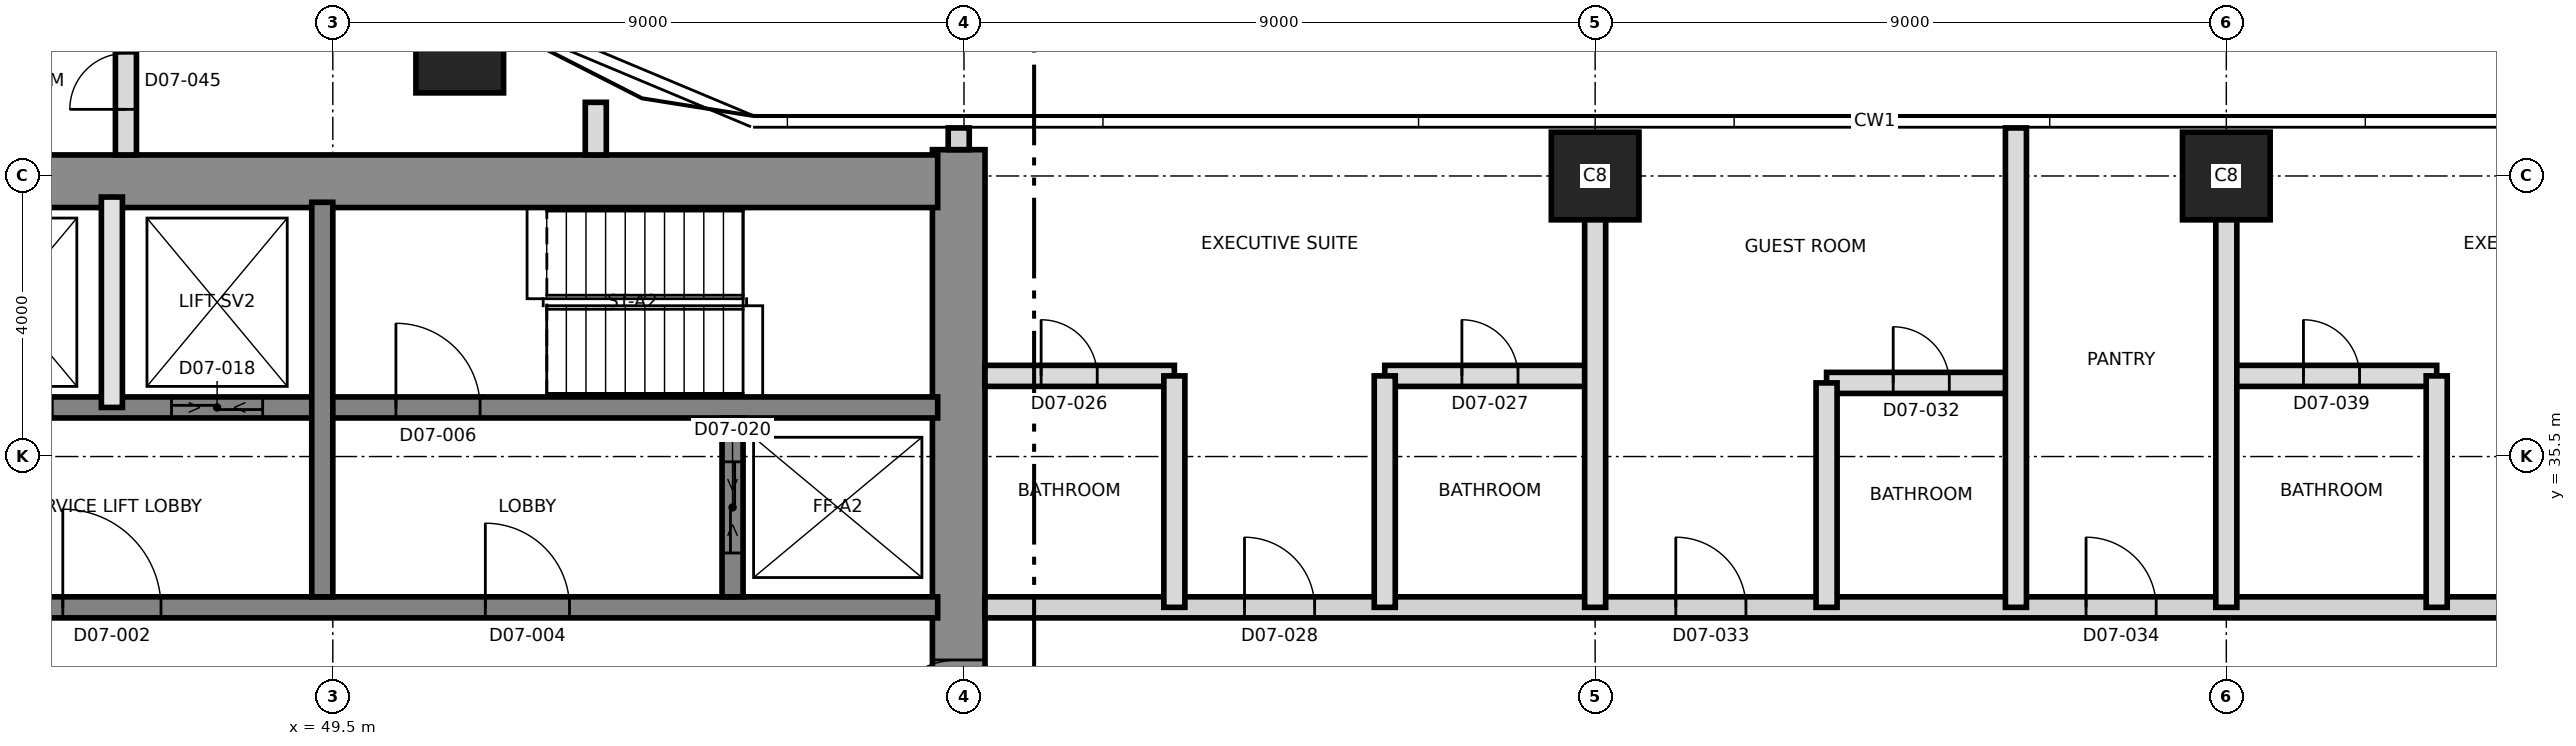
"""IFC4 building model, lengths in metres.
Left out: names, types, materials, properties, quantities, classifications, styles, units other than length and angle.
Written with IfcOpenShell. Run it as: python <this file> out.ifc"""

import sys

from ifc_helpers import new_model, si_unit, direction, frame, frame_2d, origin, origin_2d, place, context, subcontext, project, spatial, rectangle, extrude, element, fill, save


model = new_model("IFC4")
c1 = context("Model", 3, precision=1e-05, world=origin(), true_north=direction((0.0, 1.0)))
c2 = subcontext(c1, "Body", "Model", "MODEL_VIEW")
j1 = project(units=[si_unit("LENGTHUNIT", "METRE"), si_unit("PLANEANGLEUNIT", "RADIAN")], contexts=[c1])
p1 = place(None, origin())
s1 = spatial("IfcSite", under=j1, at=p1, CompositionType="ELEMENT")
p2 = place(p1, origin())
s2 = spatial("IfcBuilding", under=s1, at=p2, CompositionType="ELEMENT")
p3 = place(p2, frame((0.0, 0.0, 87.1)))
s3 = spatial("IfcBuildingStorey", under=s2, at=p3, CompositionType="ELEMENT", Elevation=87.1)
p4 = place(p3, frame((58.425, 21.125, 0.0), z_axis=(0.0, 0.0, 1.0), x_axis=(0.0, 1.0, 0.0)))
e1 = element("IfcWall", 1, at=p4, inside=s3, PredefinedType="SHEAR", context=c2, shape_type="SweptSolid", body=[
    extrude(rectangle(XDim=18.75, YDim=0.75, at=frame_2d((9.375, 0.0))), origin(), (0.0, 0.0, 1.0), 3.7),
])
p5 = place(p4, frame((10.275, 0.0, 0.0)))
e2 = element("IfcOpeningElement", 2, at=p5, cuts=e1, PredefinedType="OPENING", context=c2, shape_type="SweptSolid", body=[
    extrude(rectangle(XDim=1.2, YDim=2.1, at=frame_2d((0.6, 1.05))), frame((0.0, 0.385, 0.0), z_axis=(0.0, -1.0, 0.0), x_axis=(1.0, 0.0, 0.0)), (0.0, 0.0, 1.0), 0.77),
])
p6 = place(p3, frame((31.125, 39.425, 0.0), z_axis=(0.0, 0.0, 1.0), x_axis=(1.0, 0.0, 0.0)))
e3 = element("IfcWall", 3, at=p6, inside=s3, PredefinedType="SHEAR", context=c2, shape_type="SweptSolid", body=[
    extrude(rectangle(XDim=27.0, YDim=0.75, at=frame_2d((13.5, 0.0))), origin(), (0.0, 0.0, 1.0), 3.7),
])
p7 = place(p6, frame((10.575, 0.0, 0.0)))
e4 = element("IfcOpeningElement", 4, at=p7, cuts=e3, PredefinedType="OPENING", context=c2, shape_type="SweptSolid", body=[
    extrude(rectangle(XDim=1.2, YDim=2.1, at=frame_2d((0.6, 1.05))), frame((0.0, 0.385, 0.0), z_axis=(0.0, -1.0, 0.0), x_axis=(1.0, 0.0, 0.0)), (0.0, 0.0, 1.0), 0.77),
])
p8 = place(p3, frame((31.875, 33.35, 0.0), z_axis=(0.0, 0.0, 1.0), x_axis=(1.0, 0.0, 0.0)))
e5 = element("IfcWall", 5, at=p8, inside=s3, PredefinedType="SHEAR", context=c2, shape_type="SweptSolid", body=[
    extrude(rectangle(XDim=26.25, YDim=0.3, at=frame_2d((13.125, 0.0))), origin(), (0.0, 0.0, 1.0), 3.7),
])
p9 = place(p8, frame((13.775, 0.0, 0.0)))
e6 = element("IfcOpeningElement", 6, at=p9, cuts=e5, PredefinedType="OPENING", context=c2, shape_type="SweptSolid", body=[
    extrude(rectangle(XDim=1.4, YDim=2.1, at=frame_2d((0.7, 1.05))), frame((0.0, 0.16, 0.0), z_axis=(0.0, -1.0, 0.0), x_axis=(1.0, 0.0, 0.0)), (0.0, 0.0, 1.0), 0.32),
])
p10 = place(p8, frame((5.25, 0.0, 0.0)))
e7 = element("IfcOpeningElement", 7, at=p10, cuts=e5, PredefinedType="OPENING", context=c2, shape_type="SweptSolid", body=[
    extrude(rectangle(XDim=1.2, YDim=2.1, at=frame_2d((0.6, 1.05))), frame((0.0, 0.16, 0.0), z_axis=(0.0, -1.0, 0.0), x_axis=(1.0, 0.0, 0.0)), (0.0, 0.0, 1.0), 0.32),
])
p11 = place(p8, frame((19.8, 0.0, 0.0)))
e8 = element("IfcOpeningElement", 8, at=p11, cuts=e5, PredefinedType="OPENING", context=c2, shape_type="SweptSolid", body=[
    extrude(rectangle(XDim=1.2, YDim=2.1, at=frame_2d((0.6, 1.05))), frame((0.0, 0.16, 0.0), z_axis=(0.0, -1.0, 0.0), x_axis=(1.0, 0.0, 0.0)), (0.0, 0.0, 1.0), 0.32),
])
p12 = place(p3, frame((43.5, 36.2, 0.0), z_axis=(0.0, 0.0, 1.0), x_axis=(1.0, 0.0, 0.0)))
e9 = element("IfcWall", 9, at=p12, inside=s3, PredefinedType="SHEAR", context=c2, shape_type="SweptSolid", body=[
    extrude(rectangle(XDim=14.625, YDim=0.3, at=frame_2d((7.312, 0.0))), origin(), (0.0, 0.0, 1.0), 3.7),
])
p13 = place(p12, frame((6.9, 0.0, 0.0)))
e10 = element("IfcOpeningElement", 10, at=p13, cuts=e9, PredefinedType="OPENING", context=c2, shape_type="SweptSolid", body=[
    extrude(rectangle(XDim=1.2, YDim=2.1, at=frame_2d((0.6, 1.05))), frame((0.0, 0.16, 0.0), z_axis=(0.0, -1.0, 0.0), x_axis=(1.0, 0.0, 0.0)), (0.0, 0.0, 1.0), 0.32),
])
p14 = place(p12, frame((0.7, 0.0, 0.0)))
e11 = element("IfcOpeningElement", 11, at=p14, cuts=e9, PredefinedType="OPENING", context=c2, shape_type="SweptSolid", body=[
    extrude(rectangle(XDim=1.3, YDim=2.4, at=frame_2d((0.65, 1.2))), frame((0.0, 0.16, 0.0), z_axis=(0.0, -1.0, 0.0), x_axis=(1.0, 0.0, 0.0)), (0.0, 0.0, 1.0), 0.32),
])
p15 = place(p12, frame((3.7, 0.0, 0.0)))
e12 = element("IfcOpeningElement", 12, at=p15, cuts=e9, PredefinedType="OPENING", context=c2, shape_type="SweptSolid", body=[
    extrude(rectangle(XDim=1.3, YDim=2.4, at=frame_2d((0.65, 1.2))), frame((0.0, 0.16, 0.0), z_axis=(0.0, -1.0, 0.0), x_axis=(1.0, 0.0, 0.0)), (0.0, 0.0, 1.0), 0.32),
])
p16 = place(p3, frame((49.35, 33.5, 0.0), z_axis=(0.0, 0.0, 1.0), x_axis=(0.0, 1.0, 0.0)))
e13 = element("IfcWall", 13, at=p16, inside=s3, PredefinedType="SHEAR", context=c2, shape_type="SweptSolid", body=[
    extrude(rectangle(XDim=5.625, YDim=0.3, at=frame_2d((2.812, 0.0))), origin(), (0.0, 0.0, 1.0), 3.7),
])
p17 = place(p3, frame((55.2, 33.5, 0.0), z_axis=(0.0, 0.0, 1.0), x_axis=(0.0, 1.0, 0.0)))
e14 = element("IfcWall", 14, at=p17, inside=s3, PredefinedType="SHEAR", context=c2, shape_type="SweptSolid", body=[
    extrude(rectangle(XDim=2.55, YDim=0.3, at=frame_2d((1.275, 0.0))), origin(), (0.0, 0.0, 1.0), 3.7),
])
p18 = place(p17, frame((0.625, 0.0, 0.0)))
e15 = element("IfcOpeningElement", 15, at=p18, cuts=e14, PredefinedType="OPENING", context=c2, shape_type="SweptSolid", body=[
    extrude(rectangle(XDim=1.3, YDim=2.4, at=frame_2d((0.65, 1.2))), frame((0.0, 0.16, 0.0), z_axis=(0.0, -1.0, 0.0), x_axis=(1.0, 0.0, 0.0)), (0.0, 0.0, 1.0), 0.32),
])
for number, where, z_axis, x_axis in (
    (16, (67.5, 39.5, 0.0), (0.0, 0.0, 1.0), (1.0, 0.0, 0.0)),
    (17, (76.5, 39.5, 0.0), (0.0, 0.0, 1.0), (1.0, 0.0, 0.0)),
    (18, (51.31, 41.31, 0.0), (0.0, 0.0, 1.0), (1.0, 0.0, 0.0)),
):
    element("IfcColumn", number, at=place(p3, frame(where, z_axis=z_axis, x_axis=x_axis)), inside=s3, PredefinedType="COLUMN", context=c2, shape_type="SweptSolid", body=[
        extrude(rectangle(XDim=1.25, YDim=1.25, at=origin_2d()), origin(), (0.0, 0.0, 1.0), 3.7),
    ])
p19 = place(p3, frame((46.35, 36.2, 0.0), z_axis=(0.0, 0.0, 1.0), x_axis=(0.0, 1.0, 0.0)))
e19 = element("IfcWall", 19, at=p19, inside=s3, PredefinedType="SOLIDWALL", context=c2, shape_type="SweptSolid", body=[
    extrude(rectangle(XDim=3.0, YDim=0.3, at=frame_2d((1.5, 0.0))), origin(), (0.0, 0.0, 1.0), 3.4),
])
p20 = place(p3, frame((58.8, 33.35, 0.0), z_axis=(0.0, 0.0, 1.0), x_axis=(1.0, 0.0, 0.0)))
e20 = element("IfcWall", 20, at=p20, inside=s3, PredefinedType="PARTITIONING", context=c2, shape_type="SweptSolid", body=[
    extrude(rectangle(XDim=26.53, YDim=0.3, at=frame_2d((13.265, 0.0))), origin(), (0.0, 0.0, 1.0), 3.4),
])
p21 = place(p20, frame((3.7, 0.0, 0.0)))
e21 = element("IfcOpeningElement", 21, at=p21, cuts=e20, PredefinedType="OPENING", context=c2, shape_type="SweptSolid", body=[
    extrude(rectangle(XDim=1.0, YDim=2.4, at=frame_2d((0.5, 1.2))), frame((0.0, 0.16, 0.0), z_axis=(0.0, -1.0, 0.0), x_axis=(1.0, 0.0, 0.0)), (0.0, 0.0, 1.0), 0.32),
])
p22 = place(p20, frame((9.85, 0.0, 0.0)))
e22 = element("IfcOpeningElement", 22, at=p22, cuts=e20, PredefinedType="OPENING", context=c2, shape_type="SweptSolid", body=[
    extrude(rectangle(XDim=1.0, YDim=2.1, at=frame_2d((0.5, 1.05))), frame((0.0, 0.16, 0.0), z_axis=(0.0, -1.0, 0.0), x_axis=(1.0, 0.0, 0.0)), (0.0, 0.0, 1.0), 0.32),
])
p23 = place(p20, frame((15.7, 0.0, 0.0)))
e23 = element("IfcOpeningElement", 23, at=p23, cuts=e20, PredefinedType="OPENING", context=c2, shape_type="SweptSolid", body=[
    extrude(rectangle(XDim=1.0, YDim=2.1, at=frame_2d((0.5, 1.05))), frame((0.0, 0.16, 0.0), z_axis=(0.0, -1.0, 0.0), x_axis=(1.0, 0.0, 0.0)), (0.0, 0.0, 1.0), 0.32),
])
p24 = place(p20, frame((21.7, 0.0, 0.0)))
e24 = element("IfcOpeningElement", 24, at=p24, cuts=e20, PredefinedType="OPENING", context=c2, shape_type="SweptSolid", body=[
    extrude(rectangle(XDim=1.0, YDim=2.4, at=frame_2d((0.5, 1.2))), frame((0.0, 0.16, 0.0), z_axis=(0.0, -1.0, 0.0), x_axis=(1.0, 0.0, 0.0)), (0.0, 0.0, 1.0), 0.32),
])
p25 = place(p3, frame((70.8, 36.55, 0.0), z_axis=(0.0, 0.0, 1.0), x_axis=(1.0, 0.0, 0.0)))
e25 = element("IfcWall", 25, at=p25, inside=s3, PredefinedType="PARTITIONING", context=c2, shape_type="SweptSolid", body=[
    extrude(rectangle(XDim=2.7, YDim=0.3, at=frame_2d((1.35, 0.0))), origin(), (0.0, 0.0, 1.0), 3.4),
])
p26 = place(p25, frame((0.95, 0.0, 0.0)))
e26 = element("IfcOpeningElement", 26, at=p26, cuts=e25, PredefinedType="OPENING", context=c2, shape_type="SweptSolid", body=[
    extrude(rectangle(XDim=0.8, YDim=2.1, at=frame_2d((0.4, 1.05))), frame((0.0, 0.16, 0.0), z_axis=(0.0, -1.0, 0.0), x_axis=(1.0, 0.0, 0.0)), (0.0, 0.0, 1.0), 0.32),
])
p27 = place(p3, frame((58.8, 36.65, 0.0), z_axis=(0.0, 0.0, 1.0), x_axis=(1.0, 0.0, 0.0)))
e27 = element("IfcWall", 27, at=p27, inside=s3, PredefinedType="PARTITIONING", context=c2, shape_type="SweptSolid", body=[
    extrude(rectangle(XDim=2.7, YDim=0.3, at=frame_2d((1.35, 0.0))), origin(), (0.0, 0.0, 1.0), 3.4),
])
p28 = place(p27, frame((0.8, 0.0, 0.0)))
e28 = element("IfcOpeningElement", 28, at=p28, cuts=e27, PredefinedType="OPENING", context=c2, shape_type="SweptSolid", body=[
    extrude(rectangle(XDim=0.8, YDim=2.1, at=frame_2d((0.4, 1.05))), frame((0.0, 0.16, 0.0), z_axis=(0.0, -1.0, 0.0), x_axis=(1.0, 0.0, 0.0)), (0.0, 0.0, 1.0), 0.32),
])
p29 = place(p3, frame((64.5, 36.65, 0.0), z_axis=(0.0, 0.0, 1.0), x_axis=(1.0, 0.0, 0.0)))
e29 = element("IfcWall", 29, at=p29, inside=s3, PredefinedType="PARTITIONING", context=c2, shape_type="SweptSolid", body=[
    extrude(rectangle(XDim=3.0, YDim=0.3, at=frame_2d((1.5, 0.0))), origin(), (0.0, 0.0, 1.0), 3.4),
])
p30 = place(p29, frame((1.1, 0.0, 0.0)))
e30 = element("IfcOpeningElement", 30, at=p30, cuts=e29, PredefinedType="OPENING", context=c2, shape_type="SweptSolid", body=[
    extrude(rectangle(XDim=0.8, YDim=2.1, at=frame_2d((0.4, 1.05))), frame((0.0, 0.16, 0.0), z_axis=(0.0, -1.0, 0.0), x_axis=(1.0, 0.0, 0.0)), (0.0, 0.0, 1.0), 0.32),
])
p31 = place(p3, frame((76.5, 36.65, 0.0), z_axis=(0.0, 0.0, 1.0), x_axis=(1.0, 0.0, 0.0)))
e31 = element("IfcWall", 31, at=p31, inside=s3, PredefinedType="PARTITIONING", context=c2, shape_type="SweptSolid", body=[
    extrude(rectangle(XDim=3.0, YDim=0.3, at=frame_2d((1.5, 0.0))), origin(), (0.0, 0.0, 1.0), 3.4),
])
p32 = place(p31, frame((1.1, 0.0, 0.0)))
e32 = element("IfcOpeningElement", 32, at=p32, cuts=e31, PredefinedType="OPENING", context=c2, shape_type="SweptSolid", body=[
    extrude(rectangle(XDim=0.8, YDim=2.1, at=frame_2d((0.4, 1.05))), frame((0.0, 0.16, 0.0), z_axis=(0.0, -1.0, 0.0), x_axis=(1.0, 0.0, 0.0)), (0.0, 0.0, 1.0), 0.32),
])
p33 = place(p3, frame((46.55, 39.8, 0.0), z_axis=(0.0, 0.0, 1.0), x_axis=(0.0, 1.0, 0.0)))
e33 = element("IfcWall", 33, at=p33, inside=s3, PredefinedType="PARTITIONING", context=c2, shape_type="SweptSolid", body=[
    extrude(rectangle(XDim=2.4, YDim=0.3, at=frame_2d((1.2, 0.0))), origin(), (0.0, 0.0, 1.0), 3.4),
])
p34 = place(p33, frame((0.65, 0.0, 0.0)))
e34 = element("IfcOpeningElement", 34, at=p34, cuts=e33, PredefinedType="OPENING", context=c2, shape_type="SweptSolid", body=[
    extrude(rectangle(XDim=0.8, YDim=2.1, at=frame_2d((0.4, 1.05))), frame((0.0, 0.16, 0.0), z_axis=(0.0, -1.0, 0.0), x_axis=(1.0, 0.0, 0.0)), (0.0, 0.0, 1.0), 0.32),
])
p35 = place(p3, frame((53.25, 39.8, 0.0), z_axis=(0.0, 0.0, 1.0), x_axis=(0.0, 1.0, 0.0)))
e35 = element("IfcWall", 35, at=p35, inside=s3, PredefinedType="PARTITIONING", context=c2, shape_type="SweptSolid", body=[
    extrude(rectangle(XDim=0.75, YDim=0.3, at=frame_2d((0.375, 0.0))), origin(), (0.0, 0.0, 1.0), 3.4),
])
for number, where, z_axis, x_axis in (
    (36, (61.5, 33.35, 0.0), (0.0, 0.0, 1.0), (0.0, 1.0, 0.0)),
    (37, (64.5, 33.35, 0.0), (0.0, 0.0, 1.0), (0.0, 1.0, 0.0)),
):
    element("IfcWall", number, at=place(p3, frame(where, z_axis=z_axis, x_axis=x_axis)), inside=s3, PredefinedType="PARTITIONING", context=c2, shape_type="SweptSolid", body=[
        extrude(rectangle(XDim=3.3, YDim=0.3, at=frame_2d((1.65, 0.0))), origin(), (0.0, 0.0, 1.0), 3.4),
    ])
p36 = place(p3, frame((67.5, 33.35, 0.0), z_axis=(0.0, 0.0, 1.0), x_axis=(0.0, 1.0, 0.0)))
e38 = element("IfcWall", 38, at=p36, inside=s3, PredefinedType="PARTITIONING", context=c2, shape_type="SweptSolid", body=[
    extrude(rectangle(XDim=6.655, YDim=0.3, at=frame_2d((3.327, 0.0))), origin(), (0.0, 0.0, 1.0), 3.4),
])
p37 = place(p3, frame((70.8, 33.35, 0.0), z_axis=(0.0, 0.0, 1.0), x_axis=(0.0, 1.0, 0.0)))
e39 = element("IfcWall", 39, at=p37, inside=s3, PredefinedType="PARTITIONING", context=c2, shape_type="SweptSolid", body=[
    extrude(rectangle(XDim=3.2, YDim=0.3, at=frame_2d((1.6, 0.0))), origin(), (0.0, 0.0, 1.0), 3.4),
])
p38 = place(p3, frame((73.5, 33.35, 0.0), z_axis=(0.0, 0.0, 1.0), x_axis=(0.0, 1.0, 0.0)))
e40 = element("IfcWall", 40, at=p38, inside=s3, PredefinedType="PARTITIONING", context=c2, shape_type="SweptSolid", body=[
    extrude(rectangle(XDim=6.835, YDim=0.3, at=frame_2d((3.417, 0.0))), origin(), (0.0, 0.0, 1.0), 3.4),
])
p39 = place(p3, frame((76.5, 33.35, 0.0), z_axis=(0.0, 0.0, 1.0), x_axis=(0.0, 1.0, 0.0)))
e41 = element("IfcWall", 41, at=p39, inside=s3, PredefinedType="PARTITIONING", context=c2, shape_type="SweptSolid", body=[
    extrude(rectangle(XDim=6.655, YDim=0.3, at=frame_2d((3.327, 0.0))), origin(), (0.0, 0.0, 1.0), 3.4),
])
p40 = place(p3, frame((79.5, 33.35, 0.0), z_axis=(0.0, 0.0, 1.0), x_axis=(0.0, 1.0, 0.0)))
e42 = element("IfcWall", 42, at=p40, inside=s3, PredefinedType="PARTITIONING", context=c2, shape_type="SweptSolid", body=[
    extrude(rectangle(XDim=3.3, YDim=0.3, at=frame_2d((1.65, 0.0))), origin(), (0.0, 0.0, 1.0), 3.4),
])
p41 = place(p3, frame((58.425, 39.875, 0.0), z_axis=(0.0, 0.0, 1.0), x_axis=(0.0, 1.0, 0.0)))
e43 = element("IfcWall", 43, at=p41, inside=s3, PredefinedType="PARTITIONING", context=c2, shape_type="SweptSolid", body=[
    extrude(rectangle(XDim=0.31, YDim=0.3, at=frame_2d((0.155, 0.0))), origin(), (0.0, 0.0, 1.0), 3.4),
])
p42 = place(p9, origin())
e44 = element("IfcDoor", 44, at=p42, inside=s3, OperationType="SINGLE_SWING_RIGHT", PredefinedType="DOOR", context=c2, shape_type="SweptSolid", body=[
    extrude(rectangle(XDim=1.4, YDim=2.1, at=frame_2d((0.7, 1.05))), frame((0.0, 0.025, 0.0), z_axis=(0.0, -1.0, 0.0), x_axis=(1.0, 0.0, 0.0)), (0.0, 0.0, 1.0), 0.05),
])
fill(e6, e44)
p43 = place(p11, origin())
e45 = element("IfcDoor", 45, at=p43, inside=s3, OperationType="SINGLE_SWING_RIGHT", PredefinedType="DOOR", context=c2, shape_type="SweptSolid", body=[
    extrude(rectangle(XDim=1.2, YDim=2.1, at=frame_2d((0.6, 1.05))), frame((0.0, 0.025, 0.0), z_axis=(0.0, -1.0, 0.0), x_axis=(1.0, 0.0, 0.0)), (0.0, 0.0, 1.0), 0.05),
])
fill(e8, e45)
p44 = place(p13, origin())
e46 = element("IfcDoor", 46, at=p44, inside=s3, OperationType="SINGLE_SWING_LEFT", PredefinedType="DOOR", context=c2, shape_type="SweptSolid", body=[
    extrude(rectangle(XDim=1.2, YDim=2.1, at=frame_2d((0.6, 1.05))), frame((0.0, 0.025, 0.0), z_axis=(0.0, -1.0, 0.0), x_axis=(1.0, 0.0, 0.0)), (0.0, 0.0, 1.0), 0.05),
])
fill(e10, e46)
p45 = place(p5, origin())
e47 = element("IfcDoor", 47, at=p45, inside=s3, OperationType="SINGLE_SWING_LEFT", PredefinedType="DOOR", context=c2, shape_type="SweptSolid", body=[
    extrude(rectangle(XDim=1.2, YDim=2.1, at=frame_2d((0.6, 1.05))), frame((0.0, 0.025, 0.0), z_axis=(0.0, -1.0, 0.0), x_axis=(1.0, 0.0, 0.0)), (0.0, 0.0, 1.0), 0.05),
])
fill(e2, e47)
p46 = place(p15, origin())
e48 = element("IfcDoor", 48, at=p46, inside=s3, OperationType="SLIDING_TO_LEFT", PredefinedType="DOOR", context=c2, shape_type="SweptSolid", body=[
    extrude(rectangle(XDim=1.3, YDim=2.4, at=frame_2d((0.65, 1.2))), frame((0.0, 0.025, 0.0), z_axis=(0.0, -1.0, 0.0), x_axis=(1.0, 0.0, 0.0)), (0.0, 0.0, 1.0), 0.05),
])
fill(e12, e48)
p47 = place(p18, origin())
e49 = element("IfcDoor", 49, at=p47, inside=s3, OperationType="SLIDING_TO_LEFT", PredefinedType="DOOR", context=c2, shape_type="SweptSolid", body=[
    extrude(rectangle(XDim=1.3, YDim=2.4, at=frame_2d((0.65, 1.2))), frame((0.0, 0.025, 0.0), z_axis=(0.0, -1.0, 0.0), x_axis=(1.0, 0.0, 0.0)), (0.0, 0.0, 1.0), 0.05),
])
fill(e15, e49)
p48 = place(p28, origin())
e50 = element("IfcDoor", 50, at=p48, inside=s3, OperationType="SINGLE_SWING_LEFT", PredefinedType="DOOR", context=c2, shape_type="SweptSolid", body=[
    extrude(rectangle(XDim=0.8, YDim=2.1, at=frame_2d((0.4, 1.05))), frame((0.0, 0.025, 0.0), z_axis=(0.0, -1.0, 0.0), x_axis=(1.0, 0.0, 0.0)), (0.0, 0.0, 1.0), 0.05),
])
fill(e28, e50)
p49 = place(p30, origin())
e51 = element("IfcDoor", 51, at=p49, inside=s3, OperationType="SINGLE_SWING_RIGHT", PredefinedType="DOOR", context=c2, shape_type="SweptSolid", body=[
    extrude(rectangle(XDim=0.8, YDim=2.1, at=frame_2d((0.4, 1.05))), frame((0.0, 0.025, 0.0), z_axis=(0.0, -1.0, 0.0), x_axis=(1.0, 0.0, 0.0)), (0.0, 0.0, 1.0), 0.05),
])
fill(e30, e51)
p50 = place(p21, origin())
e52 = element("IfcDoor", 52, at=p50, inside=s3, OperationType="SINGLE_SWING_LEFT", PredefinedType="DOOR", context=c2, shape_type="SweptSolid", body=[
    extrude(rectangle(XDim=1.0, YDim=2.4, at=frame_2d((0.5, 1.2))), frame((0.0, 0.025, 0.0), z_axis=(0.0, -1.0, 0.0), x_axis=(1.0, 0.0, 0.0)), (0.0, 0.0, 1.0), 0.05),
])
fill(e21, e52)
p51 = place(p26, origin())
e53 = element("IfcDoor", 53, at=p51, inside=s3, OperationType="SINGLE_SWING_LEFT", PredefinedType="DOOR", context=c2, shape_type="SweptSolid", body=[
    extrude(rectangle(XDim=0.8, YDim=2.1, at=frame_2d((0.4, 1.05))), frame((0.0, 0.025, 0.0), z_axis=(0.0, -1.0, 0.0), x_axis=(1.0, 0.0, 0.0)), (0.0, 0.0, 1.0), 0.05),
])
fill(e26, e53)
p52 = place(p22, origin())
e54 = element("IfcDoor", 54, at=p52, inside=s3, OperationType="SINGLE_SWING_LEFT", PredefinedType="DOOR", context=c2, shape_type="SweptSolid", body=[
    extrude(rectangle(XDim=1.0, YDim=2.1, at=frame_2d((0.5, 1.05))), frame((0.0, 0.025, 0.0), z_axis=(0.0, -1.0, 0.0), x_axis=(1.0, 0.0, 0.0)), (0.0, 0.0, 1.0), 0.05),
])
fill(e22, e54)
p53 = place(p23, origin())
e55 = element("IfcDoor", 55, at=p53, inside=s3, OperationType="SINGLE_SWING_RIGHT", PredefinedType="DOOR", context=c2, shape_type="SweptSolid", body=[
    extrude(rectangle(XDim=1.0, YDim=2.1, at=frame_2d((0.5, 1.05))), frame((0.0, 0.025, 0.0), z_axis=(0.0, -1.0, 0.0), x_axis=(1.0, 0.0, 0.0)), (0.0, 0.0, 1.0), 0.05),
])
fill(e23, e55)
p54 = place(p32, origin())
e56 = element("IfcDoor", 56, at=p54, inside=s3, OperationType="SINGLE_SWING_RIGHT", PredefinedType="DOOR", context=c2, shape_type="SweptSolid", body=[
    extrude(rectangle(XDim=0.8, YDim=2.1, at=frame_2d((0.4, 1.05))), frame((0.0, 0.025, 0.0), z_axis=(0.0, -1.0, 0.0), x_axis=(1.0, 0.0, 0.0)), (0.0, 0.0, 1.0), 0.05),
])
fill(e32, e56)
p55 = place(p34, origin())
e57 = element("IfcDoor", 57, at=p55, inside=s3, OperationType="SINGLE_SWING_RIGHT", PredefinedType="DOOR", context=c2, shape_type="SweptSolid", body=[
    extrude(rectangle(XDim=0.8, YDim=2.1, at=frame_2d((0.4, 1.05))), frame((0.0, 0.025, 0.0), z_axis=(0.0, -1.0, 0.0), x_axis=(1.0, 0.0, 0.0)), (0.0, 0.0, 1.0), 0.05),
])
fill(e34, e57)
save(model, sys.argv[1])
